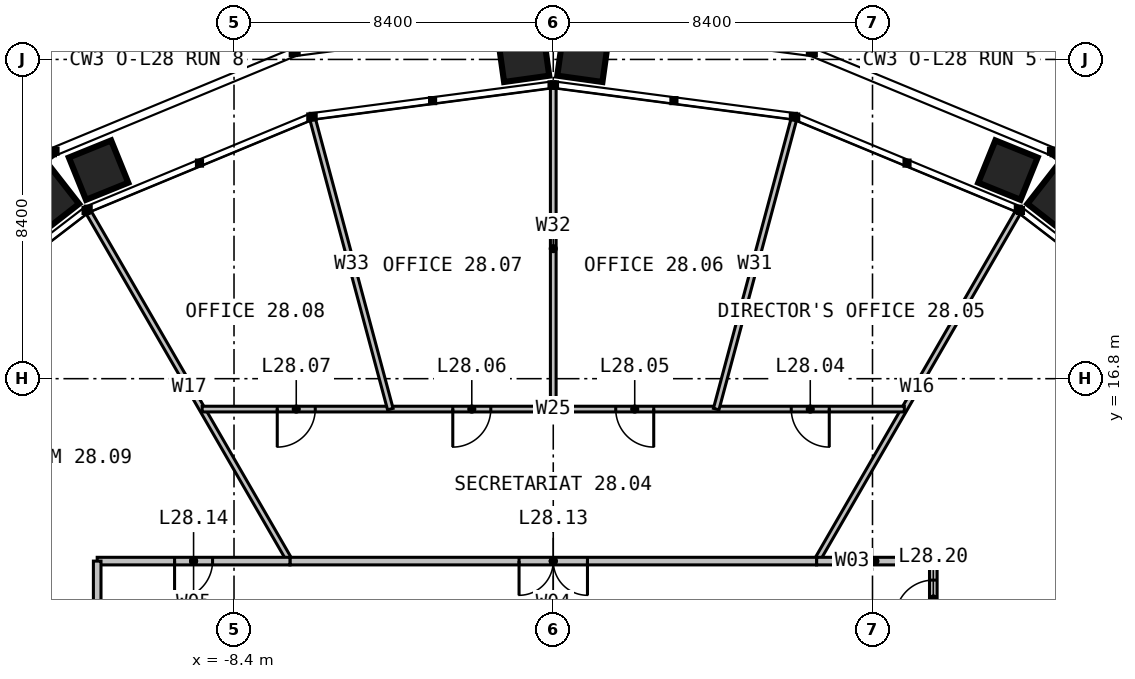
"""IFC4 building model, lengths in metres.
Left out: names, types, materials, properties, quantities, classifications, styles, units other than length and angle.
Written with IfcOpenShell. Run it as: python <this file> out.ifc"""

import sys

from ifc_helpers import new_model, si_unit, direction, frame, frame_2d, origin, place, context, subcontext, project, spatial, rectangle, extrude, element, fill, save


model = new_model("IFC4")
c1 = context("Model", 3, precision=1e-05, world=origin(), true_north=direction((0.0, 1.0)))
c2 = subcontext(c1, "Body", "Model", "MODEL_VIEW")
j1 = project(units=[si_unit("LENGTHUNIT", "METRE"), si_unit("PLANEANGLEUNIT", "RADIAN")], contexts=[c1])
p1 = place(None, origin())
s1 = spatial("IfcSite", under=j1, at=p1, CompositionType="ELEMENT")
p2 = place(p1, origin())
s2 = spatial("IfcBuilding", under=s1, at=p2, CompositionType="ELEMENT")
p3 = place(p2, frame((0.0, 0.0, 118.0)))
s3 = spatial("IfcBuildingStorey", under=s2, at=p3, CompositionType="ELEMENT", Elevation=118.0)
for number, where, z_axis, x_axis in (
    (1, (6.928, 12.0, 0.0), (0.0, 0.0, 1.0), (0.5, 0.866, 0.0)),
    (2, (-6.928, 12.0, 0.0), (0.0, 0.0, 1.0), (-0.5, 0.866, 0.0)),
    (3, (-12.0, 6.928, 0.0), (0.0, 0.0, 1.0), (-0.866, 0.5, 0.0)),
):
    element("IfcWall", number, at=place(p3, frame(where, z_axis=z_axis, x_axis=x_axis)), inside=s3, PredefinedType="PARTITIONING", context=c2, shape_type="SweptSolid", body=[
        extrude(rectangle(XDim=10.587, YDim=0.15, at=frame_2d((5.293, 0.0))), origin(), (0.0, 0.0, 1.0), 2.79),
    ])
p4 = place(p3, frame((10.0, 12.0, 0.0), z_axis=(0.0, 0.0, 1.0), x_axis=(-1.0, 0.0, 0.0)))
e4 = element("IfcWall", 4, at=p4, inside=s3, PredefinedType="PARTITIONING", context=c2, shape_type="SweptSolid", body=[
    extrude(rectangle(XDim=3.072, YDim=0.2, at=frame_2d((1.536, 0.0))), origin(), (0.0, 0.0, 1.0), 3.8),
])
p5 = place(p3, frame((9.238, 16.0, 0.0), z_axis=(0.0, 0.0, 1.0), x_axis=(-1.0, 0.0, 0.0)))
e5 = element("IfcWall", 5, at=p5, inside=s3, PredefinedType="PARTITIONING", context=c2, shape_type="SweptSolid", body=[
    extrude(rectangle(XDim=18.475, YDim=0.15, at=frame_2d((9.238, 0.0))), origin(), (0.0, 0.0, 1.0), 2.79),
])
p6 = place(p5, frame((1.975, 0.0, 0.0)))
e6 = element("IfcOpeningElement", 6, at=p6, cuts=e5, PredefinedType="OPENING", context=c2, shape_type="SweptSolid", body=[
    extrude(rectangle(XDim=1.0, YDim=2.2, at=frame_2d((0.5, 1.1))), frame((0.0, 0.085, 0.0), z_axis=(0.0, -1.0, 0.0), x_axis=(1.0, 0.0, 0.0)), (0.0, 0.0, 1.0), 0.17),
])
p7 = place(p5, frame((6.594, 0.0, 0.0)))
e7 = element("IfcOpeningElement", 7, at=p7, cuts=e5, PredefinedType="OPENING", context=c2, shape_type="SweptSolid", body=[
    extrude(rectangle(XDim=1.0, YDim=2.2, at=frame_2d((0.5, 1.1))), frame((0.0, 0.085, 0.0), z_axis=(0.0, -1.0, 0.0), x_axis=(1.0, 0.0, 0.0)), (0.0, 0.0, 1.0), 0.17),
])
p8 = place(p5, frame((10.881, 0.0, 0.0)))
e8 = element("IfcOpeningElement", 8, at=p8, cuts=e5, PredefinedType="OPENING", context=c2, shape_type="SweptSolid", body=[
    extrude(rectangle(XDim=1.0, YDim=2.2, at=frame_2d((0.5, 1.1))), frame((0.0, 0.085, 0.0), z_axis=(0.0, -1.0, 0.0), x_axis=(1.0, 0.0, 0.0)), (0.0, 0.0, 1.0), 0.17),
])
p9 = place(p5, frame((15.5, 0.0, 0.0)))
e9 = element("IfcOpeningElement", 9, at=p9, cuts=e5, PredefinedType="OPENING", context=c2, shape_type="SweptSolid", body=[
    extrude(rectangle(XDim=1.0, YDim=2.2, at=frame_2d((0.5, 1.1))), frame((0.0, 0.085, 0.0), z_axis=(0.0, -1.0, 0.0), x_axis=(1.0, 0.0, 0.0)), (0.0, 0.0, 1.0), 0.17),
])
p10 = place(p3, frame((4.287, 16.0, 0.0), z_axis=(0.0, 0.0, 1.0), x_axis=(0.258833147156, 0.965922047545, 0.0)))
e10 = element("IfcWall", 10, at=p10, inside=s3, PredefinedType="PARTITIONING", context=c2, shape_type="SweptSolid", body=[
    extrude(rectangle(XDim=7.879, YDim=0.15, at=frame_2d((3.939, 0.0))), origin(), (0.0, 0.0, 1.0), 2.79),
])
p11 = place(p3, frame((0.0, 16.0, 0.0), z_axis=(0.0, 0.0, 1.0), x_axis=(0.0, 1.0, 0.0)))
e11 = element("IfcWall", 11, at=p11, inside=s3, PredefinedType="PARTITIONING", context=c2, shape_type="SweptSolid", body=[
    extrude(rectangle(XDim=8.443, YDim=0.15, at=frame_2d((4.222, 0.0))), origin(), (0.0, 0.0, 1.0), 2.79),
])
p12 = place(p3, frame((-4.287, 16.0, 0.0), z_axis=(0.0, 0.0, 1.0), x_axis=(-0.258833147156, 0.965922047545, 0.0)))
e12 = element("IfcWall", 12, at=p12, inside=s3, PredefinedType="PARTITIONING", context=c2, shape_type="SweptSolid", body=[
    extrude(rectangle(XDim=7.879, YDim=0.15, at=frame_2d((3.939, 0.0))), origin(), (0.0, 0.0, 1.0), 2.79),
])
p13 = place(p3, frame((6.928, 12.0, 0.0), z_axis=(0.0, 0.0, 1.0), x_axis=(-1.0, 0.0, 0.0)))
e13 = element("IfcWall", 13, at=p13, inside=s3, PredefinedType="PARTITIONING", context=c2, shape_type="SweptSolid", body=[
    extrude(rectangle(XDim=13.856, YDim=0.2, at=frame_2d((6.928, 0.0))), origin(), (0.0, 0.0, 1.0), 3.8),
])
p14 = place(p13, frame((6.028, 0.0, 0.0)))
e14 = element("IfcOpeningElement", 14, at=p14, cuts=e13, PredefinedType="OPENING", context=c2, shape_type="SweptSolid", body=[
    extrude(rectangle(XDim=1.8, YDim=2.2, at=frame_2d((0.9, 1.1))), frame((0.0, 0.11, 0.0), z_axis=(0.0, -1.0, 0.0), x_axis=(1.0, 0.0, 0.0)), (0.0, 0.0, 1.0), 0.22),
])
p15 = place(p3, frame((-6.928, 12.0, 0.0), z_axis=(0.0, 0.0, 1.0), x_axis=(-1.0, 0.0, 0.0)))
e15 = element("IfcWall", 15, at=p15, inside=s3, PredefinedType="PARTITIONING", context=c2, shape_type="SweptSolid", body=[
    extrude(rectangle(XDim=5.072, YDim=0.2, at=frame_2d((2.536, 0.0))), origin(), (0.0, 0.0, 1.0), 3.8),
])
p16 = place(p15, frame((2.036, 0.0, 0.0)))
e16 = element("IfcOpeningElement", 16, at=p16, cuts=e15, PredefinedType="OPENING", context=c2, shape_type="SweptSolid", body=[
    extrude(rectangle(XDim=1.0, YDim=2.2, at=frame_2d((0.5, 1.1))), frame((0.0, 0.11, 0.0), z_axis=(0.0, -1.0, 0.0), x_axis=(1.0, 0.0, 0.0)), (0.0, 0.0, 1.0), 0.22),
])
p17 = place(p3, frame((-12.0, 12.0, 0.0), z_axis=(0.0, 0.0, 1.0), x_axis=(0.0, -1.0, 0.0)))
e17 = element("IfcWall", 17, at=p17, inside=s3, PredefinedType="PARTITIONING", context=c2, shape_type="SweptSolid", body=[
    extrude(rectangle(XDim=5.072, YDim=0.2, at=frame_2d((2.536, 0.0))), origin(), (0.0, 0.0, 1.0), 3.8),
])
p18 = place(p3, frame((10.0, 10.0, 0.0), z_axis=(0.0, 0.0, 1.0), x_axis=(0.0, 1.0, 0.0)))
e18 = element("IfcWall", 18, at=p18, inside=s3, PredefinedType="PARTITIONING", context=c2, shape_type="SweptSolid", body=[
    extrude(rectangle(XDim=2.0, YDim=0.2, at=frame_2d((1.0, 0.0))), origin(), (0.0, 0.0, 1.0), 3.8),
])
p19 = place(p18, frame((0.5, 0.0, 0.0)))
e19 = element("IfcOpeningElement", 19, at=p19, cuts=e18, PredefinedType="OPENING", context=c2, shape_type="SweptSolid", body=[
    extrude(rectangle(XDim=1.0, YDim=2.2, at=frame_2d((0.5, 1.1))), frame((0.0, 0.11, 0.0), z_axis=(0.0, -1.0, 0.0), x_axis=(1.0, 0.0, 0.0)), (0.0, 0.0, 1.0), 0.22),
])
p20 = place(p6, origin())
e20 = element("IfcDoor", 20, at=p20, inside=s3, OperationType="SINGLE_SWING_LEFT", PredefinedType="DOOR", context=c2, shape_type="SweptSolid", body=[
    extrude(rectangle(XDim=1.0, YDim=2.2, at=frame_2d((0.5, 1.1))), frame((0.0, 0.025, 0.0), z_axis=(0.0, -1.0, 0.0), x_axis=(1.0, 0.0, 0.0)), (0.0, 0.0, 1.0), 0.05),
])
fill(e6, e20)
p21 = place(p7, origin())
e21 = element("IfcDoor", 21, at=p21, inside=s3, OperationType="SINGLE_SWING_LEFT", PredefinedType="DOOR", context=c2, shape_type="SweptSolid", body=[
    extrude(rectangle(XDim=1.0, YDim=2.2, at=frame_2d((0.5, 1.1))), frame((0.0, 0.025, 0.0), z_axis=(0.0, -1.0, 0.0), x_axis=(1.0, 0.0, 0.0)), (0.0, 0.0, 1.0), 0.05),
])
fill(e7, e21)
p22 = place(p8, origin())
e22 = element("IfcDoor", 22, at=p22, inside=s3, OperationType="SINGLE_SWING_RIGHT", PredefinedType="DOOR", context=c2, shape_type="SweptSolid", body=[
    extrude(rectangle(XDim=1.0, YDim=2.2, at=frame_2d((0.5, 1.1))), frame((0.0, 0.025, 0.0), z_axis=(0.0, -1.0, 0.0), x_axis=(1.0, 0.0, 0.0)), (0.0, 0.0, 1.0), 0.05),
])
fill(e8, e22)
p23 = place(p9, origin())
e23 = element("IfcDoor", 23, at=p23, inside=s3, OperationType="SINGLE_SWING_RIGHT", PredefinedType="DOOR", context=c2, shape_type="SweptSolid", body=[
    extrude(rectangle(XDim=1.0, YDim=2.2, at=frame_2d((0.5, 1.1))), frame((0.0, 0.025, 0.0), z_axis=(0.0, -1.0, 0.0), x_axis=(1.0, 0.0, 0.0)), (0.0, 0.0, 1.0), 0.05),
])
fill(e9, e23)
p24 = place(p14, origin())
e24 = element("IfcDoor", 24, at=p24, inside=s3, OperationType="DOUBLE_DOOR_SINGLE_SWING", PredefinedType="DOOR", context=c2, shape_type="SweptSolid", body=[
    extrude(rectangle(XDim=1.8, YDim=2.2, at=frame_2d((0.9, 1.1))), frame((0.0, 0.025, 0.0), z_axis=(0.0, -1.0, 0.0), x_axis=(1.0, 0.0, 0.0)), (0.0, 0.0, 1.0), 0.05),
])
fill(e14, e24)
p25 = place(p16, origin())
e25 = element("IfcDoor", 25, at=p25, inside=s3, OperationType="SINGLE_SWING_RIGHT", PredefinedType="DOOR", context=c2, shape_type="SweptSolid", body=[
    extrude(rectangle(XDim=1.0, YDim=2.2, at=frame_2d((0.5, 1.1))), frame((0.0, 0.025, 0.0), z_axis=(0.0, -1.0, 0.0), x_axis=(1.0, 0.0, 0.0)), (0.0, 0.0, 1.0), 0.05),
])
fill(e16, e25)
p26 = place(p19, origin())
e26 = element("IfcDoor", 26, at=p26, inside=s3, OperationType="SINGLE_SWING_LEFT", PredefinedType="DOOR", context=c2, shape_type="SweptSolid", body=[
    extrude(rectangle(XDim=1.0, YDim=2.2, at=frame_2d((0.5, 1.1))), frame((0.0, 0.025, 0.0), z_axis=(0.0, -1.0, 0.0), x_axis=(1.0, 0.0, 0.0)), (0.0, 0.0, 1.0), 0.05),
])
fill(e19, e26)
save(model, sys.argv[1])
